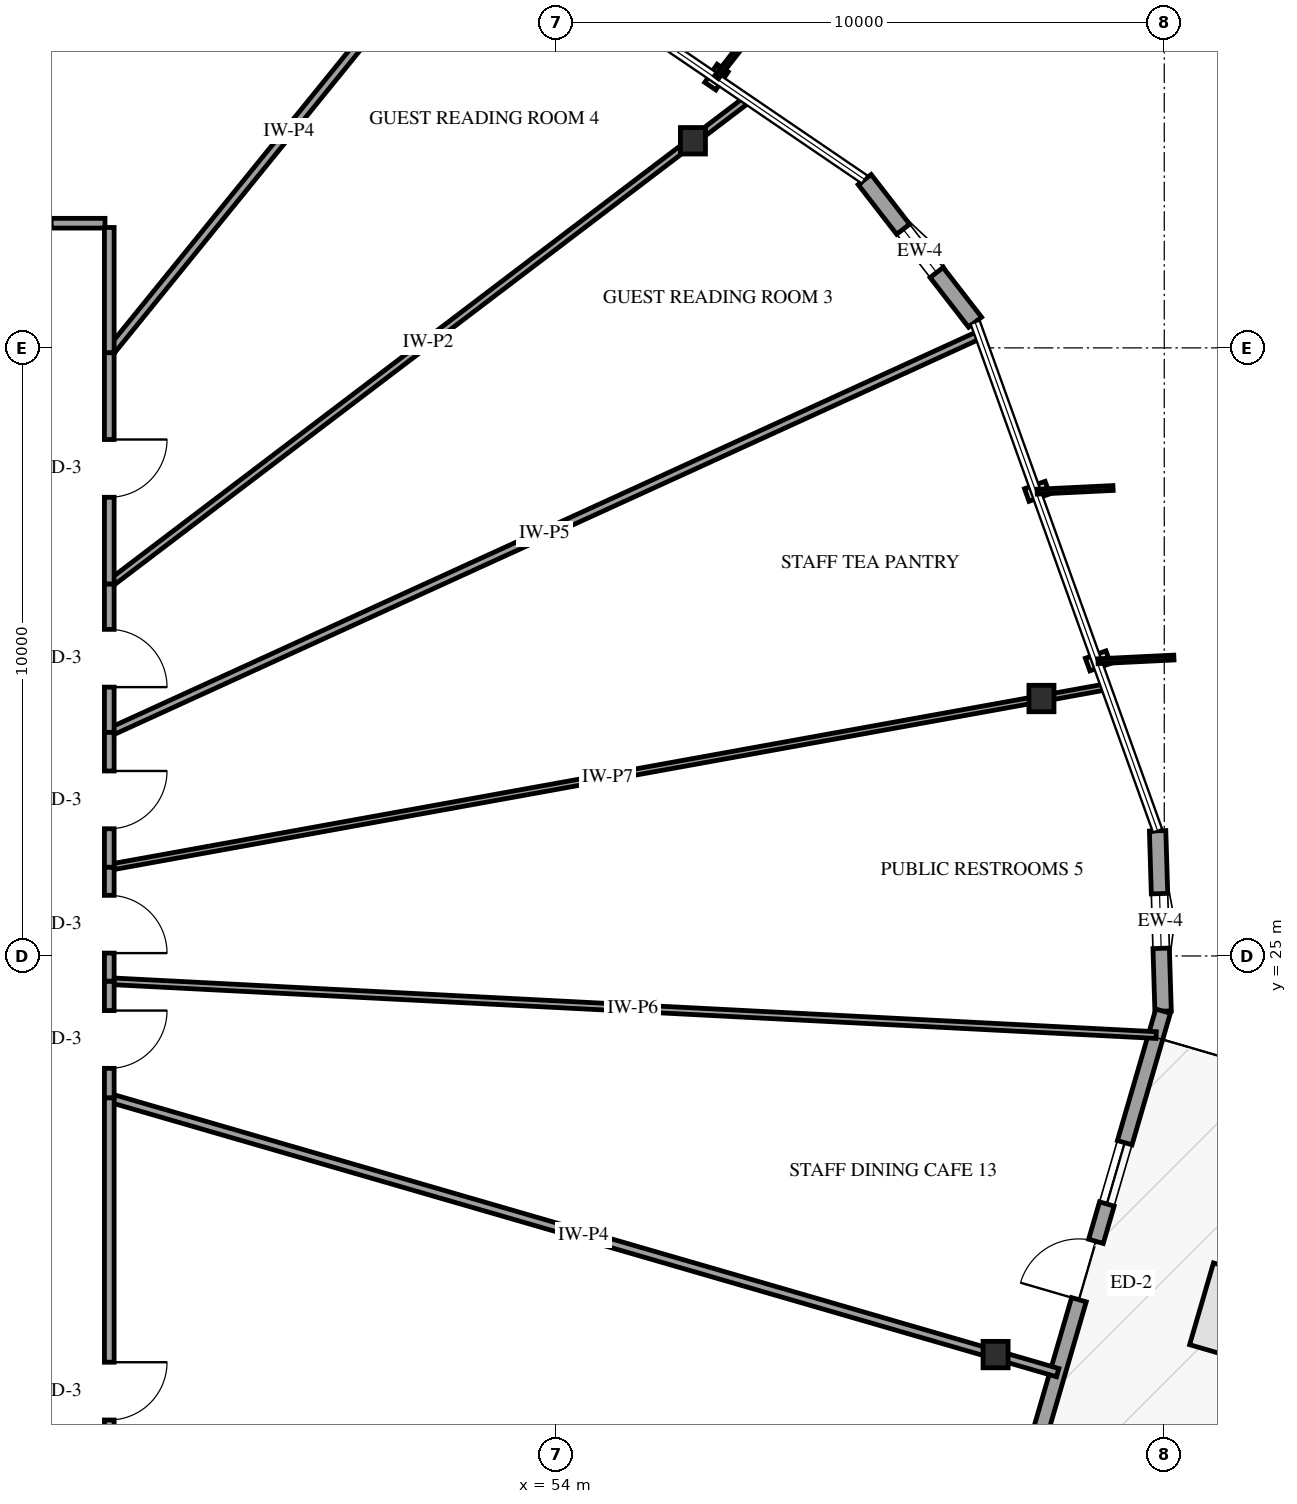
"""IFC4 building model, lengths in metres.
Left out: names, types, materials, properties, quantities, classifications, styles, units other than length and angle.
Written with IfcOpenShell. Run it as: python <this file> out.ifc"""

import sys

from ifc_helpers import new_model, si_unit, direction, frame, frame_2d, origin, origin_2d, place, context, subcontext, project, spatial, rectangle, i_section, extrude, element, fill, save


model = new_model("IFC4")
c1 = context("Model", 3, precision=1e-05, world=origin(), true_north=direction((0.0, 1.0)))
c2 = subcontext(c1, "Body", "Model", "MODEL_VIEW")
j1 = project(units=[si_unit("LENGTHUNIT", "METRE"), si_unit("PLANEANGLEUNIT", "RADIAN")], contexts=[c1])
p1 = place(None, origin())
s1 = spatial("IfcSite", under=j1, at=p1, CompositionType="ELEMENT")
p2 = place(p1, origin())
s2 = spatial("IfcBuilding", under=s1, at=p2, CompositionType="ELEMENT")
p3 = place(p2, frame((0.0, 0.0, 171.4)))
s3 = spatial("IfcBuildingStorey", under=s2, at=p3, CompositionType="ELEMENT", Elevation=171.4)
for number, where, z_axis, x_axis in (
    (1, (61.98, 29.234, 0.0), (0.0, 0.0, 1.0), (1.0, 0.0, 0.0)),
    (2, (56.249, 38.406, 0.0), (0.0, 0.0, 1.0), (1.0, 0.0, 0.0)),
    (3, (61.226, 18.444, 0.0), (0.0, 0.0, 1.0), (1.0, 0.0, 0.0)),
):
    element("IfcColumn", number, at=place(p3, frame(where, z_axis=z_axis, x_axis=x_axis)), inside=s3, PredefinedType="COLUMN", context=c2, shape_type="SweptSolid", body=[
        extrude(i_section(OverallWidth=0.412, OverallDepth=0.435, WebThickness=0.036, FlangeThickness=0.057, FilletRadius=0.038, at=origin_2d()), origin(), (0.0, 0.0, 1.0), 3.6),
    ])
p4 = place(p3, frame((63.98, 24.093, 0.0), z_axis=(0.0, 0.0, 1.0), x_axis=(-0.030366361796, 0.999538835699, 0.0)))
e4 = element("IfcWall", 4, at=p4, inside=s3, PredefinedType="SOLIDWALL", context=c2, shape_type="SweptSolid", body=[
    extrude(rectangle(XDim=2.967, YDim=0.27, at=frame_2d((1.483, 0.0))), origin(), (0.0, 0.0, 1.0), 2.679),
])
p5 = place(p4, frame((1.033, 0.0, 0.75)))
e5 = element("IfcOpeningElement", 5, at=p5, cuts=e4, PredefinedType="OPENING", context=c2, shape_type="SweptSolid", body=[
    extrude(rectangle(XDim=0.9, YDim=1.5, at=frame_2d((0.45, 0.75))), frame((0.0, 0.145, 0.0), z_axis=(0.0, -1.0, 0.0), x_axis=(1.0, 0.0, 0.0)), (0.0, 0.0, 1.0), 0.29),
])
p6 = place(p3, frame((61.492, 15.561, 0.0), z_axis=(0.0, 0.0, 1.0), x_axis=(0.28, 0.96, 0.0)))
e6 = element("IfcWall", 6, at=p6, inside=s3, PredefinedType="SOLIDWALL", context=c2, shape_type="SweptSolid", body=[
    extrude(rectangle(XDim=8.887, YDim=0.25, at=frame_2d((4.443, 0.0))), origin(), (0.0, 0.0, 1.0), 2.679),
])
p7 = place(p6, frame((3.943, 0.0, 0.0)))
e7 = element("IfcOpeningElement", 7, at=p7, cuts=e6, PredefinedType="OPENING", context=c2, shape_type="SweptSolid", body=[
    extrude(rectangle(XDim=1.0, YDim=2.15, at=frame_2d((0.5, 1.075))), frame((0.0, 0.135, 0.0), z_axis=(0.0, -1.0, 0.0), x_axis=(1.0, 0.0, 0.0)), (0.0, 0.0, 1.0), 0.27),
])
p8 = place(p6, frame((0.44, 0.0, 0.72)))
e8 = element("IfcOpeningElement", 8, at=p8, cuts=e6, PredefinedType="OPENING", context=c2, shape_type="SweptSolid", body=[
    extrude(rectangle(XDim=1.05, YDim=1.55, at=frame_2d((0.525, 0.775))), frame((0.0, 0.135, 0.0), z_axis=(0.0, -1.0, 0.0), x_axis=(1.0, 0.0, 0.0)), (0.0, 0.0, 1.0), 0.27),
])
p9 = place(p6, frame((5.583, 0.0, 0.72)))
e9 = element("IfcOpeningElement", 9, at=p9, cuts=e6, PredefinedType="OPENING", context=c2, shape_type="SweptSolid", body=[
    extrude(rectangle(XDim=1.05, YDim=1.55, at=frame_2d((0.525, 0.775))), frame((0.0, 0.135, 0.0), z_axis=(0.0, -1.0, 0.0), x_axis=(1.0, 0.0, 0.0)), (0.0, 0.0, 1.0), 0.27),
])
p10 = place(p3, frame((60.889, 35.422, 0.0), z_axis=(0.0, 0.0, 1.0), x_axis=(-0.612110117852, 0.790772535956, 0.0)))
e10 = element("IfcWall", 10, at=p10, inside=s3, PredefinedType="SOLIDWALL", context=c2, shape_type="SweptSolid", body=[
    extrude(rectangle(XDim=2.967, YDim=0.27, at=frame_2d((1.483, 0.0))), origin(), (0.0, 0.0, 1.0), 2.679),
])
p11 = place(p10, frame((1.033, 0.0, 0.75)))
e11 = element("IfcOpeningElement", 11, at=p11, cuts=e10, PredefinedType="OPENING", context=c2, shape_type="SweptSolid", body=[
    extrude(rectangle(XDim=0.9, YDim=1.5, at=frame_2d((0.45, 0.75))), frame((0.0, 0.145, 0.0), z_axis=(0.0, -1.0, 0.0), x_axis=(1.0, 0.0, 0.0)), (0.0, 0.0, 1.0), 0.29),
])
p12 = place(p3, frame((63.866, 23.699, 0.0), z_axis=(0.0, 0.0, 1.0), x_axis=(-0.998675507062, 0.051451254551, 0.0)))
e12 = element("IfcWall", 12, at=p12, inside=s3, PredefinedType="PARTITIONING", context=c2, shape_type="SweptSolid", body=[
    extrude(rectangle(XDim=17.239, YDim=0.11, at=frame_2d((8.62, 0.0))), origin(), (0.0, 0.0, 1.0), 3.3),
])
p13 = place(p3, frame((46.65, 26.458, 0.0), z_axis=(0.0, 0.0, 1.0), x_axis=(0.984008673772, 0.178120548904, 0.0)))
e13 = element("IfcWall", 13, at=p13, inside=s3, PredefinedType="PARTITIONING", context=c2, shape_type="SweptSolid", body=[
    extrude(rectangle(XDim=16.657, YDim=0.1, at=frame_2d((8.329, 0.0))), origin(), (0.0, 0.0, 1.0), 2.595),
])
p14 = place(p3, frame((46.65, 22.668, 0.0), z_axis=(0.0, 0.0, 1.0), x_axis=(0.960481163068, -0.278344993473, 0.0)))
e14 = element("IfcWall", 14, at=p14, inside=s3, PredefinedType="PARTITIONING", context=c2, shape_type="SweptSolid", body=[
    extrude(rectangle(XDim=16.239, YDim=0.14, at=frame_2d((8.12, 0.0))), origin(), (0.0, 0.0, 1.0), 3.3),
])
p15 = place(p3, frame((46.65, 28.677, 0.0), z_axis=(0.0, 0.0, 1.0), x_axis=(0.909594452682, 0.41549721016, 0.0)))
e15 = element("IfcWall", 15, at=p15, inside=s3, PredefinedType="PARTITIONING", context=c2, shape_type="SweptSolid", body=[
    extrude(rectangle(XDim=15.736, YDim=0.13, at=frame_2d((7.868, 0.0))), origin(), (0.0, 0.0, 1.0), 3.3),
])
p16 = place(p3, frame((46.65, 31.115, 0.0), z_axis=(0.0, 0.0, 1.0), x_axis=(0.79632035824, 0.604875100375, 0.0)))
e16 = element("IfcWall", 16, at=p16, inside=s3, PredefinedType="PARTITIONING", context=c2, shape_type="SweptSolid", body=[
    extrude(rectangle(XDim=13.175, YDim=0.12, at=frame_2d((6.587, 0.0))), origin(), (0.0, 0.0, 1.0), 3.3),
])
p17 = place(p3, frame((46.65, 22.668, 0.0), z_axis=(0.0, 0.0, 1.0), x_axis=(0.0, -1.0, 0.0)))
e17 = element("IfcWall", 17, at=p17, inside=s3, PredefinedType="PARTITIONING", context=c2, shape_type="SweptSolid", body=[
    extrude(rectangle(XDim=9.648, YDim=0.16, at=frame_2d((4.824, 0.0))), origin(), (0.0, 0.0, 1.0), 3.3),
])
p18 = place(p17, frame((4.349, 0.0, 0.0)))
e18 = element("IfcOpeningElement", 18, at=p18, cuts=e17, PredefinedType="OPENING", context=c2, shape_type="SweptSolid", body=[
    extrude(rectangle(XDim=0.95, YDim=2.15, at=frame_2d((0.475, 1.075))), frame((0.0, 0.09, 0.0), z_axis=(0.0, -1.0, 0.0), x_axis=(1.0, 0.0, 0.0)), (0.0, 0.0, 1.0), 0.18),
])
p19 = place(p3, frame((46.65, 34.921, 0.0), z_axis=(0.0, 0.0, 1.0), x_axis=(0.63011430349, 0.776502391842, 0.0)))
e19 = element("IfcWall", 19, at=p19, inside=s3, PredefinedType="PARTITIONING", context=c2, shape_type="SweptSolid", body=[
    extrude(rectangle(XDim=9.379, YDim=0.14, at=frame_2d((4.69, 0.0))), origin(), (0.0, 0.0, 1.0), 3.3),
])
p20 = place(p3, frame((43.86, 37.05, 0.0), z_axis=(0.0, 0.0, 1.0), x_axis=(0.400185264295, 0.916434260731, 0.0)))
e20 = element("IfcWall", 20, at=p20, inside=s3, PredefinedType="PARTITIONING", context=c2, shape_type="SweptSolid", body=[
    extrude(rectangle(XDim=7.076, YDim=0.13, at=frame_2d((3.538, 0.0))), origin(), (0.0, 0.0, 1.0), 2.595),
])
p21 = place(p3, frame((46.65, 34.921, 0.0), z_axis=(0.0, 0.0, 1.0), x_axis=(0.0, -1.0, 0.0)))
e21 = element("IfcWall", 21, at=p21, inside=s3, PredefinedType="PARTITIONING", context=c2, shape_type="SweptSolid", body=[
    extrude(rectangle(XDim=3.806, YDim=0.16, at=frame_2d((1.903, 0.0))), origin(), (0.0, 0.0, 1.0), 3.3),
])
p22 = place(p21, frame((1.428, 0.0, 0.0)))
e22 = element("IfcOpeningElement", 22, at=p22, cuts=e21, PredefinedType="OPENING", context=c2, shape_type="SweptSolid", body=[
    extrude(rectangle(XDim=0.95, YDim=2.15, at=frame_2d((0.475, 1.075))), frame((0.0, 0.09, 0.0), z_axis=(0.0, -1.0, 0.0), x_axis=(1.0, 0.0, 0.0)), (0.0, 0.0, 1.0), 0.18),
])
p23 = place(p3, frame((43.86, 37.05, 0.0), z_axis=(0.0, 0.0, 1.0), x_axis=(1.0, 0.0, 0.0)))
e23 = element("IfcWall", 23, at=p23, inside=s3, PredefinedType="PARTITIONING", context=c2, shape_type="SweptSolid", body=[
    extrude(rectangle(XDim=2.72, YDim=0.16, at=frame_2d((1.36, 0.0))), origin(), (0.0, 0.0, 1.0), 3.3),
])
p24 = place(p23, frame((0.885, 0.0, 0.0)))
e24 = element("IfcOpeningElement", 24, at=p24, cuts=e23, PredefinedType="OPENING", context=c2, shape_type="SweptSolid", body=[
    extrude(rectangle(XDim=0.95, YDim=2.15, at=frame_2d((0.475, 1.075))), frame((0.0, 0.09, 0.0), z_axis=(0.0, -1.0, 0.0), x_axis=(1.0, 0.0, 0.0)), (0.0, 0.0, 1.0), 0.18),
])
p25 = place(p3, frame((46.65, 31.115, 0.0), z_axis=(0.0, 0.0, 1.0), x_axis=(0.0, -1.0, 0.0)))
e25 = element("IfcWall", 25, at=p25, inside=s3, PredefinedType="PARTITIONING", context=c2, shape_type="SweptSolid", body=[
    extrude(rectangle(XDim=2.438, YDim=0.16, at=frame_2d((1.219, 0.0))), origin(), (0.0, 0.0, 1.0), 3.3),
])
p26 = place(p25, frame((0.744, 0.0, 0.0)))
e26 = element("IfcOpeningElement", 26, at=p26, cuts=e25, PredefinedType="OPENING", context=c2, shape_type="SweptSolid", body=[
    extrude(rectangle(XDim=0.95, YDim=2.15, at=frame_2d((0.475, 1.075))), frame((0.0, 0.09, 0.0), z_axis=(0.0, -1.0, 0.0), x_axis=(1.0, 0.0, 0.0)), (0.0, 0.0, 1.0), 0.18),
])
p27 = place(p3, frame((46.65, 28.677, 0.0), z_axis=(0.0, 0.0, 1.0), x_axis=(0.0, -1.0, 0.0)))
e27 = element("IfcWall", 27, at=p27, inside=s3, PredefinedType="PARTITIONING", context=c2, shape_type="SweptSolid", body=[
    extrude(rectangle(XDim=2.219, YDim=0.16, at=frame_2d((1.109, 0.0))), origin(), (0.0, 0.0, 1.0), 3.3),
])
p28 = place(p27, frame((0.635, 0.0, 0.0)))
e28 = element("IfcOpeningElement", 28, at=p28, cuts=e27, PredefinedType="OPENING", context=c2, shape_type="SweptSolid", body=[
    extrude(rectangle(XDim=0.95, YDim=2.15, at=frame_2d((0.475, 1.075))), frame((0.0, 0.09, 0.0), z_axis=(0.0, -1.0, 0.0), x_axis=(1.0, 0.0, 0.0)), (0.0, 0.0, 1.0), 0.18),
])
p29 = place(p3, frame((46.65, 36.98, 0.0), z_axis=(0.0, 0.0, 1.0), x_axis=(0.0, -1.0, 0.0)))
e29 = element("IfcWall", 29, at=p29, inside=s3, PredefinedType="PARTITIONING", context=c2, shape_type="SweptSolid", body=[
    extrude(rectangle(XDim=2.059, YDim=0.16, at=frame_2d((1.03, 0.0))), origin(), (0.0, 0.0, 1.0), 3.3),
])
p30 = place(p3, frame((46.65, 24.586, 0.0), z_axis=(0.0, 0.0, 1.0), x_axis=(0.0, -1.0, 0.0)))
e30 = element("IfcWall", 30, at=p30, inside=s3, PredefinedType="PARTITIONING", context=c2, shape_type="SweptSolid", body=[
    extrude(rectangle(XDim=1.918, YDim=0.16, at=frame_2d((0.959, 0.0))), origin(), (0.0, 0.0, 1.0), 3.3),
])
p31 = place(p30, frame((0.484, 0.0, 0.0)))
e31 = element("IfcOpeningElement", 31, at=p31, cuts=e30, PredefinedType="OPENING", context=c2, shape_type="SweptSolid", body=[
    extrude(rectangle(XDim=0.95, YDim=2.15, at=frame_2d((0.475, 1.075))), frame((0.0, 0.09, 0.0), z_axis=(0.0, -1.0, 0.0), x_axis=(1.0, 0.0, 0.0)), (0.0, 0.0, 1.0), 0.18),
])
p32 = place(p3, frame((46.65, 26.458, 0.0), z_axis=(0.0, 0.0, 1.0), x_axis=(0.0, -1.0, 0.0)))
e32 = element("IfcWall", 32, at=p32, inside=s3, PredefinedType="PARTITIONING", context=c2, shape_type="SweptSolid", body=[
    extrude(rectangle(XDim=1.872, YDim=0.16, at=frame_2d((0.936, 0.0))), origin(), (0.0, 0.0, 1.0), 3.3),
])
p33 = place(p32, frame((0.461, 0.0, 0.0)))
e33 = element("IfcOpeningElement", 33, at=p33, cuts=e32, PredefinedType="OPENING", context=c2, shape_type="SweptSolid", body=[
    extrude(rectangle(XDim=0.95, YDim=2.15, at=frame_2d((0.475, 1.075))), frame((0.0, 0.09, 0.0), z_axis=(0.0, -1.0, 0.0), x_axis=(1.0, 0.0, 0.0)), (0.0, 0.0, 1.0), 0.18),
])
p34 = place(p5, origin())
e34 = element("IfcWindow", 34, at=p34, inside=s3, PartitioningType="SINGLE_PANEL", PredefinedType="WINDOW", context=c2, shape_type="SweptSolid", body=[
    extrude(rectangle(XDim=0.9, YDim=1.5, at=frame_2d((0.45, 0.75))), frame((0.0, 0.03, 0.0), z_axis=(0.0, -1.0, 0.0), x_axis=(1.0, 0.0, 0.0)), (0.0, 0.0, 1.0), 0.06),
])
fill(e5, e34)
p35 = place(p7, origin())
e35 = element("IfcDoor", 35, at=p35, inside=s3, OperationType="SINGLE_SWING_LEFT", PredefinedType="DOOR", context=c2, shape_type="SweptSolid", body=[
    extrude(rectangle(XDim=1.0, YDim=2.15, at=frame_2d((0.5, 1.075))), frame((0.0, 0.025, 0.0), z_axis=(0.0, -1.0, 0.0), x_axis=(1.0, 0.0, 0.0)), (0.0, 0.0, 1.0), 0.05),
])
fill(e7, e35)
p36 = place(p9, origin())
e36 = element("IfcWindow", 36, at=p36, inside=s3, PartitioningType="SINGLE_PANEL", PredefinedType="WINDOW", context=c2, shape_type="SweptSolid", body=[
    extrude(rectangle(XDim=1.05, YDim=1.55, at=frame_2d((0.525, 0.775))), frame((0.0, 0.03, 0.0), z_axis=(0.0, -1.0, 0.0), x_axis=(1.0, 0.0, 0.0)), (0.0, 0.0, 1.0), 0.06),
])
fill(e9, e36)
p37 = place(p11, origin())
e37 = element("IfcWindow", 37, at=p37, inside=s3, PartitioningType="SINGLE_PANEL", PredefinedType="WINDOW", context=c2, shape_type="SweptSolid", body=[
    extrude(rectangle(XDim=0.9, YDim=1.5, at=frame_2d((0.45, 0.75))), frame((0.0, 0.03, 0.0), z_axis=(0.0, -1.0, 0.0), x_axis=(1.0, 0.0, 0.0)), (0.0, 0.0, 1.0), 0.06),
])
fill(e11, e37)
p38 = place(p18, origin())
e38 = element("IfcDoor", 38, at=p38, inside=s3, OperationType="SINGLE_SWING_LEFT", PredefinedType="DOOR", context=c2, shape_type="SweptSolid", body=[
    extrude(rectangle(XDim=0.95, YDim=2.15, at=frame_2d((0.475, 1.075))), frame((0.0, 0.025, 0.0), z_axis=(0.0, -1.0, 0.0), x_axis=(1.0, 0.0, 0.0)), (0.0, 0.0, 1.0), 0.05),
])
fill(e18, e38)
p39 = place(p22, origin())
e39 = element("IfcDoor", 39, at=p39, inside=s3, OperationType="SINGLE_SWING_LEFT", PredefinedType="DOOR", context=c2, shape_type="SweptSolid", body=[
    extrude(rectangle(XDim=0.95, YDim=2.15, at=frame_2d((0.475, 1.075))), frame((0.0, 0.025, 0.0), z_axis=(0.0, -1.0, 0.0), x_axis=(1.0, 0.0, 0.0)), (0.0, 0.0, 1.0), 0.05),
])
fill(e22, e39)
p40 = place(p26, origin())
e40 = element("IfcDoor", 40, at=p40, inside=s3, OperationType="SINGLE_SWING_RIGHT", PredefinedType="DOOR", context=c2, shape_type="SweptSolid", body=[
    extrude(rectangle(XDim=0.95, YDim=2.15, at=frame_2d((0.475, 1.075))), frame((0.0, 0.025, 0.0), z_axis=(0.0, -1.0, 0.0), x_axis=(1.0, 0.0, 0.0)), (0.0, 0.0, 1.0), 0.05),
])
fill(e26, e40)
p41 = place(p28, origin())
e41 = element("IfcDoor", 41, at=p41, inside=s3, OperationType="SINGLE_SWING_LEFT", PredefinedType="DOOR", context=c2, shape_type="SweptSolid", body=[
    extrude(rectangle(XDim=0.95, YDim=2.15, at=frame_2d((0.475, 1.075))), frame((0.0, 0.025, 0.0), z_axis=(0.0, -1.0, 0.0), x_axis=(1.0, 0.0, 0.0)), (0.0, 0.0, 1.0), 0.05),
])
fill(e28, e41)
p42 = place(p31, origin())
e42 = element("IfcDoor", 42, at=p42, inside=s3, OperationType="SINGLE_SWING_LEFT", PredefinedType="DOOR", context=c2, shape_type="SweptSolid", body=[
    extrude(rectangle(XDim=0.95, YDim=2.15, at=frame_2d((0.475, 1.075))), frame((0.0, 0.025, 0.0), z_axis=(0.0, -1.0, 0.0), x_axis=(1.0, 0.0, 0.0)), (0.0, 0.0, 1.0), 0.05),
])
fill(e31, e42)
p43 = place(p33, origin())
e43 = element("IfcDoor", 43, at=p43, inside=s3, OperationType="SINGLE_SWING_RIGHT", PredefinedType="DOOR", context=c2, shape_type="SweptSolid", body=[
    extrude(rectangle(XDim=0.95, YDim=2.15, at=frame_2d((0.475, 1.075))), frame((0.0, 0.025, 0.0), z_axis=(0.0, -1.0, 0.0), x_axis=(1.0, 0.0, 0.0)), (0.0, 0.0, 1.0), 0.05),
])
fill(e33, e43)
save(model, sys.argv[1])
